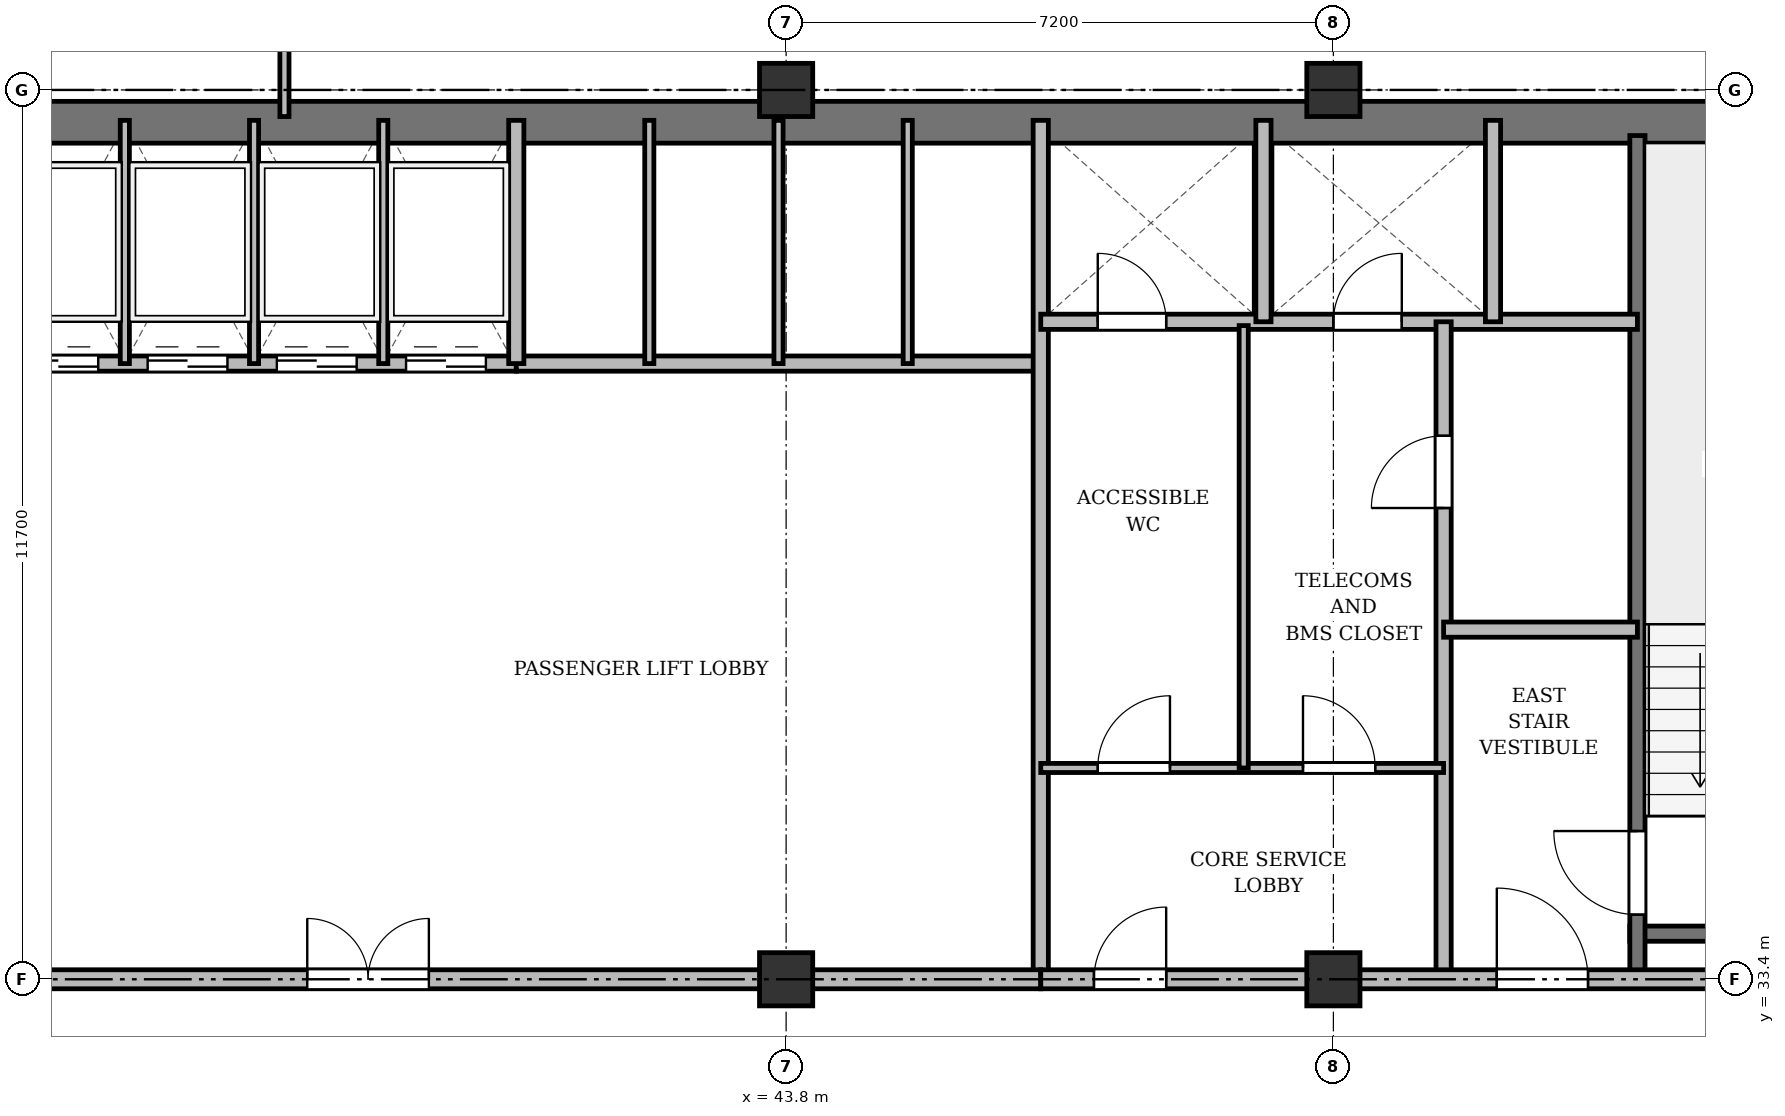
"""IFC4 building model, lengths in metres.
Left out: names, types, materials, properties, quantities, classifications, styles, units other than length and angle.
Written with IfcOpenShell. Run it as: python <this file> out.ifc"""

import sys

from ifc_helpers import new_model, si_unit, direction, frame, frame_2d, origin, origin_2d, place, context, subcontext, project, spatial, rectangle, extrude, source, transform, mapped, element, fill, save


model = new_model("IFC4")
c1 = context("Model", 3, precision=1e-05, world=origin(), true_north=direction((0.0, 1.0)))
c2 = subcontext(c1, "Body", "Model", "MODEL_VIEW")
j1 = project(units=[si_unit("LENGTHUNIT", "METRE"), si_unit("PLANEANGLEUNIT", "RADIAN")], contexts=[c1])
p1 = place(None, origin())
s1 = spatial("IfcSite", under=j1, at=p1, CompositionType="ELEMENT")
p2 = place(p1, origin())
s2 = spatial("IfcBuilding", under=s1, at=p2, CompositionType="ELEMENT")
p3 = place(p2, frame((0.0, 0.0, 204.9)))
s3 = spatial("IfcBuildingStorey", under=s2, at=p3, CompositionType="ELEMENT", Elevation=204.9)
m1 = source(origin(), c2, "Body", "SweptSolid", [
    extrude(rectangle(XDim=0.7, YDim=0.7, at=origin_2d()), origin(), (0.0, 0.0, 1.0), 3.6),
])
for number, where, z_axis, x_axis in (
    (1, (43.8, 33.4, 0.0), (0.0, 0.0, 1.0), (1.0, 0.0, 0.0)),
    (2, (43.8, 45.1, 0.0), (0.0, 0.0, 1.0), (1.0, 0.0, 0.0)),
    (3, (51.0, 33.4, 0.0), (0.0, 0.0, 1.0), (1.0, 0.0, 0.0)),
    (4, (51.0, 45.1, 0.0), (0.0, 0.0, 1.0), (1.0, 0.0, 0.0)),
):
    element("IfcColumn", number, at=place(p3, frame(where, z_axis=z_axis, x_axis=x_axis)), inside=s3, PredefinedType="COLUMN", context=c2, shape_type="MappedRepresentation", body=[
        mapped(m1, transform((0.0, 0.0, 0.0), x_axis=(1.0, 0.0, 0.0), y_axis=(0.0, 1.0, 0.0), z_axis=(0.0, 0.0, 1.0), scale=1.0)),
    ])
p4 = place(p3, frame((15.65, 44.675, 0.0), z_axis=(0.0, 0.0, 1.0), x_axis=(1.0, 0.0, 0.0)))
e5 = element("IfcWall", 5, at=p4, inside=s3, PredefinedType="SHEAR", context=c2, shape_type="SweptSolid", body=[
    extrude(rectangle(XDim=43.1, YDim=0.55, at=frame_2d((21.55, 0.0))), origin(), (0.0, 0.0, 1.0), 3.36),
])
p5 = place(p3, frame((54.9, 34.0, 0.0), z_axis=(0.0, 0.0, 1.0), x_axis=(1.0, 0.0, 0.0)))
e6 = element("IfcWall", 6, at=p5, inside=s3, PredefinedType="SHEAR", context=c2, shape_type="SweptSolid", body=[
    extrude(rectangle(XDim=3.4, YDim=0.2, at=frame_2d((1.7, 0.0))), origin(), (0.0, 0.0, 1.0), 3.36),
])
p6 = place(p3, frame((55.0, 33.4, 0.0), z_axis=(0.0, 0.0, 1.0), x_axis=(0.0, 1.0, 0.0)))
e7 = element("IfcWall", 7, at=p6, inside=s3, PredefinedType="SHEAR", context=c2, shape_type="SweptSolid", body=[
    extrude(rectangle(XDim=11.1, YDim=0.2, at=frame_2d((5.55, 0.0))), origin(), (0.0, 0.0, 1.0), 3.36),
])
p7 = place(p6, frame((0.85, 0.0, 0.0)))
e8 = element("IfcOpeningElement", 8, at=p7, cuts=e7, PredefinedType="OPENING", context=c2, shape_type="SweptSolid", body=[
    extrude(rectangle(XDim=1.1, YDim=2.15, at=frame_2d((0.55, 1.075))), frame((0.0, 0.11, 0.0), z_axis=(0.0, -1.0, 0.0), x_axis=(1.0, 0.0, 0.0)), (0.0, 0.0, 1.0), 0.22),
])
p8 = place(p3, frame((33.35, 41.5, 0.0), z_axis=(0.0, 0.0, 1.0), x_axis=(1.0, 0.0, 0.0)))
e9 = element("IfcWall", 9, at=p8, inside=s3, PredefinedType="SOLIDWALL", context=c2, shape_type="SweptSolid", body=[
    extrude(rectangle(XDim=6.9, YDim=0.2, at=frame_2d((3.45, 0.0))), origin(), (0.0, 0.0, 1.0), 3.36),
])
p9 = place(p8, frame((0.35, 0.0, 0.0)))
e10 = element("IfcOpeningElement", 10, at=p9, cuts=e9, PredefinedType="OPENING", context=c2, shape_type="SweptSolid", body=[
    extrude(rectangle(XDim=1.05, YDim=2.15, at=frame_2d((0.525, 1.075))), frame((0.0, 0.11, 0.0), z_axis=(0.0, -1.0, 0.0), x_axis=(1.0, 0.0, 0.0)), (0.0, 0.0, 1.0), 0.22),
])
p10 = place(p8, frame((2.05, 0.0, 0.0)))
e11 = element("IfcOpeningElement", 11, at=p10, cuts=e9, PredefinedType="OPENING", context=c2, shape_type="SweptSolid", body=[
    extrude(rectangle(XDim=1.05, YDim=2.15, at=frame_2d((0.525, 1.075))), frame((0.0, 0.11, 0.0), z_axis=(0.0, -1.0, 0.0), x_axis=(1.0, 0.0, 0.0)), (0.0, 0.0, 1.0), 0.22),
])
p11 = place(p8, frame((3.75, 0.0, 0.0)))
e12 = element("IfcOpeningElement", 12, at=p11, cuts=e9, PredefinedType="OPENING", context=c2, shape_type="SweptSolid", body=[
    extrude(rectangle(XDim=1.05, YDim=2.15, at=frame_2d((0.525, 1.075))), frame((0.0, 0.11, 0.0), z_axis=(0.0, -1.0, 0.0), x_axis=(1.0, 0.0, 0.0)), (0.0, 0.0, 1.0), 0.22),
])
p12 = place(p8, frame((5.45, 0.0, 0.0)))
e13 = element("IfcOpeningElement", 13, at=p12, cuts=e9, PredefinedType="OPENING", context=c2, shape_type="SweptSolid", body=[
    extrude(rectangle(XDim=1.05, YDim=2.15, at=frame_2d((0.525, 1.075))), frame((0.0, 0.11, 0.0), z_axis=(0.0, -1.0, 0.0), x_axis=(1.0, 0.0, 0.0)), (0.0, 0.0, 1.0), 0.22),
])
for number, where, z_axis, x_axis in (
    (14, (35.1, 41.5, 0.0), (0.0, 0.0, 1.0), (0.0, 1.0, 0.0)),
    (15, (36.8, 41.5, 0.0), (0.0, 0.0, 1.0), (0.0, 1.0, 0.0)),
    (16, (38.5, 41.5, 0.0), (0.0, 0.0, 1.0), (0.0, 1.0, 0.0)),
):
    element("IfcWall", number, at=place(p3, frame(where, z_axis=z_axis, x_axis=x_axis)), inside=s3, PredefinedType="PARTITIONING", context=c2, shape_type="SweptSolid", body=[
        extrude(rectangle(XDim=3.2, YDim=0.12, at=frame_2d((1.6, 0.0))), origin(), (0.0, 0.0, 1.0), 3.36),
    ])
p13 = place(p3, frame((40.25, 41.5, 0.0), z_axis=(0.0, 0.0, 1.0), x_axis=(1.0, 0.0, 0.0)))
e17 = element("IfcWall", 17, at=p13, inside=s3, PredefinedType="SOLIDWALL", context=c2, shape_type="SweptSolid", body=[
    extrude(rectangle(XDim=6.9, YDim=0.2, at=frame_2d((3.45, 0.0))), origin(), (0.0, 0.0, 1.0), 2.86),
])
p14 = place(p3, frame((40.25, 41.5, 0.0), z_axis=(0.0, 0.0, 1.0), x_axis=(0.0, 1.0, 0.0)))
e18 = element("IfcWall", 18, at=p14, inside=s3, PredefinedType="SOLIDWALL", context=c2, shape_type="SweptSolid", body=[
    extrude(rectangle(XDim=3.2, YDim=0.2, at=frame_2d((1.6, 0.0))), origin(), (0.0, 0.0, 1.0), 3.36),
])
p15 = place(p3, frame((42.0, 41.5, 0.0), z_axis=(0.0, 0.0, 1.0), x_axis=(0.0, 1.0, 0.0)))
e19 = element("IfcWall", 19, at=p15, inside=s3, PredefinedType="PARTITIONING", context=c2, shape_type="SweptSolid", body=[
    extrude(rectangle(XDim=3.2, YDim=0.12, at=frame_2d((1.6, 0.0))), origin(), (0.0, 0.0, 1.0), 3.36),
])
p16 = place(p3, frame((43.7, 41.5, 0.0), z_axis=(0.0, 0.0, 1.0), x_axis=(0.0, 1.0, 0.0)))
e20 = element("IfcWall", 20, at=p16, inside=s3, PredefinedType="PARTITIONING", context=c2, shape_type="SweptSolid", body=[
    extrude(rectangle(XDim=3.2, YDim=0.12, at=frame_2d((1.6, 0.0))), origin(), (0.0, 0.0, 1.0), 2.86),
])
p17 = place(p3, frame((45.4, 41.5, 0.0), z_axis=(0.0, 0.0, 1.0), x_axis=(0.0, 1.0, 0.0)))
e21 = element("IfcWall", 21, at=p17, inside=s3, PredefinedType="PARTITIONING", context=c2, shape_type="SweptSolid", body=[
    extrude(rectangle(XDim=3.2, YDim=0.12, at=frame_2d((1.6, 0.0))), origin(), (0.0, 0.0, 1.0), 3.36),
])
p18 = place(p3, frame((47.15, 33.4, 0.0), z_axis=(0.0, 0.0, 1.0), x_axis=(0.0, 1.0, 0.0)))
e22 = element("IfcWall", 22, at=p18, inside=s3, PredefinedType="SOLIDWALL", context=c2, shape_type="SweptSolid", body=[
    extrude(rectangle(XDim=11.3, YDim=0.2, at=frame_2d((5.65, 0.0))), origin(), (0.0, 0.0, 1.0), 2.91),
])
p19 = place(p3, frame((33.3, 33.4, 0.0), z_axis=(0.0, 0.0, 1.0), x_axis=(1.0, 0.0, 0.0)))
e23 = element("IfcWall", 23, at=p19, inside=s3, PredefinedType="PARTITIONING", context=c2, shape_type="SweptSolid", body=[
    extrude(rectangle(XDim=13.85, YDim=0.25, at=frame_2d((6.925, 0.0))), origin(), (0.0, 0.0, 1.0), 2.91),
])
p20 = place(p19, frame((4.2, 0.0, 0.0)))
e24 = element("IfcOpeningElement", 24, at=p20, cuts=e23, PredefinedType="OPENING", context=c2, shape_type="SweptSolid", body=[
    extrude(rectangle(XDim=1.6, YDim=2.2, at=frame_2d((0.8, 1.1))), frame((0.0, 0.135, 0.0), z_axis=(0.0, -1.0, 0.0), x_axis=(1.0, 0.0, 0.0)), (0.0, 0.0, 1.0), 0.27),
])
p21 = place(p3, frame((47.15, 42.05, 0.0), z_axis=(0.0, 0.0, 1.0), x_axis=(1.0, 0.0, 0.0)))
e25 = element("IfcWall", 25, at=p21, inside=s3, PredefinedType="SOLIDWALL", context=c2, shape_type="SweptSolid", body=[
    extrude(rectangle(XDim=7.85, YDim=0.2, at=frame_2d((3.925, 0.0))), origin(), (0.0, 0.0, 1.0), 2.86),
])
p22 = place(p21, frame((0.75, 0.0, 0.0)))
e26 = element("IfcOpeningElement", 26, at=p22, cuts=e25, PredefinedType="OPENING", context=c2, shape_type="SweptSolid", body=[
    extrude(rectangle(XDim=0.9, YDim=2.1, at=frame_2d((0.45, 1.05))), frame((0.0, 0.11, 0.0), z_axis=(0.0, -1.0, 0.0), x_axis=(1.0, 0.0, 0.0)), (0.0, 0.0, 1.0), 0.22),
])
p23 = place(p21, frame((3.85, 0.0, 0.0)))
e27 = element("IfcOpeningElement", 27, at=p23, cuts=e25, PredefinedType="OPENING", context=c2, shape_type="SweptSolid", body=[
    extrude(rectangle(XDim=0.9, YDim=2.1, at=frame_2d((0.45, 1.05))), frame((0.0, 0.11, 0.0), z_axis=(0.0, -1.0, 0.0), x_axis=(1.0, 0.0, 0.0)), (0.0, 0.0, 1.0), 0.22),
])
for number, where, z_axis, x_axis in (
    (28, (50.08, 42.05, 0.0), (0.0, 0.0, 1.0), (0.0, 1.0, 0.0)),
    (29, (53.1, 42.05, 0.0), (0.0, 0.0, 1.0), (0.0, 1.0, 0.0)),
):
    element("IfcWall", number, at=place(p3, frame(where, z_axis=z_axis, x_axis=x_axis)), inside=s3, PredefinedType="SOLIDWALL", context=c2, shape_type="SweptSolid", body=[
        extrude(rectangle(XDim=2.65, YDim=0.2, at=frame_2d((1.325, 0.0))), origin(), (0.0, 0.0, 1.0), 3.36),
    ])
p24 = place(p3, frame((52.45, 33.4, 0.0), z_axis=(0.0, 0.0, 1.0), x_axis=(0.0, 1.0, 0.0)))
e30 = element("IfcWall", 30, at=p24, inside=s3, PredefinedType="PARTITIONING", context=c2, shape_type="SweptSolid", body=[
    extrude(rectangle(XDim=8.65, YDim=0.2, at=frame_2d((4.325, 0.0))), origin(), (0.0, 0.0, 1.0), 2.91),
])
p25 = place(p24, frame((6.2, 0.0, 0.0)))
e31 = element("IfcOpeningElement", 31, at=p25, cuts=e30, PredefinedType="OPENING", context=c2, shape_type="SweptSolid", body=[
    extrude(rectangle(XDim=0.95, YDim=2.15, at=frame_2d((0.475, 1.075))), frame((0.0, 0.11, 0.0), z_axis=(0.0, -1.0, 0.0), x_axis=(1.0, 0.0, 0.0)), (0.0, 0.0, 1.0), 0.22),
])
p26 = place(p3, frame((52.45, 38.0, 0.0), z_axis=(0.0, 0.0, 1.0), x_axis=(1.0, 0.0, 0.0)))
e32 = element("IfcWall", 32, at=p26, inside=s3, PredefinedType="PARTITIONING", context=c2, shape_type="SweptSolid", body=[
    extrude(rectangle(XDim=2.55, YDim=0.2, at=frame_2d((1.275, 0.0))), origin(), (0.0, 0.0, 1.0), 3.36),
])
p27 = place(p3, frame((47.15, 36.18, 0.0), z_axis=(0.0, 0.0, 1.0), x_axis=(1.0, 0.0, 0.0)))
e33 = element("IfcWall", 33, at=p27, inside=s3, PredefinedType="PARTITIONING", context=c2, shape_type="SweptSolid", body=[
    extrude(rectangle(XDim=5.3, YDim=0.12, at=frame_2d((2.65, 0.0))), origin(), (0.0, 0.0, 1.0), 2.86),
])
p28 = place(p27, frame((0.75, 0.0, 0.0)))
e34 = element("IfcOpeningElement", 34, at=p28, cuts=e33, PredefinedType="OPENING", context=c2, shape_type="SweptSolid", body=[
    extrude(rectangle(XDim=0.95, YDim=2.15, at=frame_2d((0.475, 1.075))), frame((0.0, 0.07, 0.0), z_axis=(0.0, -1.0, 0.0), x_axis=(1.0, 0.0, 0.0)), (0.0, 0.0, 1.0), 0.14),
])
p29 = place(p27, frame((3.45, 0.0, 0.0)))
e35 = element("IfcOpeningElement", 35, at=p29, cuts=e33, PredefinedType="OPENING", context=c2, shape_type="SweptSolid", body=[
    extrude(rectangle(XDim=0.95, YDim=2.15, at=frame_2d((0.475, 1.075))), frame((0.0, 0.07, 0.0), z_axis=(0.0, -1.0, 0.0), x_axis=(1.0, 0.0, 0.0)), (0.0, 0.0, 1.0), 0.14),
])
p30 = place(p3, frame((49.82, 36.18, 0.0), z_axis=(0.0, 0.0, 1.0), x_axis=(0.0, 1.0, 0.0)))
e36 = element("IfcWall", 36, at=p30, inside=s3, PredefinedType="PARTITIONING", context=c2, shape_type="SweptSolid", body=[
    extrude(rectangle(XDim=5.82, YDim=0.12, at=frame_2d((2.91, 0.0))), origin(), (0.0, 0.0, 1.0), 3.36),
])
p31 = place(p3, frame((47.15, 33.4, 0.0), z_axis=(0.0, 0.0, 1.0), x_axis=(1.0, 0.0, 0.0)))
e37 = element("IfcWall", 37, at=p31, inside=s3, PredefinedType="PARTITIONING", context=c2, shape_type="SweptSolid", body=[
    extrude(rectangle(XDim=11.15, YDim=0.25, at=frame_2d((5.575, 0.0))), origin(), (0.0, 0.0, 1.0), 2.91),
])
p32 = place(p31, frame((0.7, 0.0, 0.0)))
e38 = element("IfcOpeningElement", 38, at=p32, cuts=e37, PredefinedType="OPENING", context=c2, shape_type="SweptSolid", body=[
    extrude(rectangle(XDim=0.95, YDim=2.15, at=frame_2d((0.475, 1.075))), frame((0.0, 0.135, 0.0), z_axis=(0.0, -1.0, 0.0), x_axis=(1.0, 0.0, 0.0)), (0.0, 0.0, 1.0), 0.27),
])
p33 = place(p31, frame((6.0, 0.0, 0.0)))
e39 = element("IfcOpeningElement", 39, at=p33, cuts=e37, PredefinedType="OPENING", context=c2, shape_type="SweptSolid", body=[
    extrude(rectangle(XDim=1.2, YDim=2.15, at=frame_2d((0.6, 1.075))), frame((0.0, 0.135, 0.0), z_axis=(0.0, -1.0, 0.0), x_axis=(1.0, 0.0, 0.0)), (0.0, 0.0, 1.0), 0.27),
])
p34 = place(p3, frame((37.2, 44.75, 0.0), z_axis=(0.0, 0.0, 1.0), x_axis=(0.0, 1.0, 0.0)))
e40 = element("IfcWall", 40, at=p34, inside=s3, PredefinedType="PARTITIONING", context=c2, shape_type="SweptSolid", body=[
    extrude(rectangle(XDim=3.61, YDim=0.12, at=frame_2d((1.805, 0.0))), origin(), (0.0, 0.0, 1.0), 2.91),
])
p35 = place(p34, frame((1.1, 0.0, 0.0)))
e41 = element("IfcOpeningElement", 41, at=p35, cuts=e40, PredefinedType="OPENING", context=c2, shape_type="SweptSolid", body=[
    extrude(rectangle(XDim=0.95, YDim=2.15, at=frame_2d((0.475, 1.075))), frame((0.0, 0.07, 0.0), z_axis=(0.0, -1.0, 0.0), x_axis=(1.0, 0.0, 0.0)), (0.0, 0.0, 1.0), 0.14),
])
m2 = source(origin(), c2, "Body", "SweptSolid", [
    extrude(rectangle(XDim=1.1, YDim=2.15, at=frame_2d((0.55, 1.075))), frame((0.0, 0.025, 0.0), z_axis=(0.0, -1.0, 0.0), x_axis=(1.0, 0.0, 0.0)), (0.0, 0.0, 1.0), 0.05),
])
p36 = place(p7, origin())
e42 = element("IfcDoor", 42, at=p36, inside=s3, OperationType="SINGLE_SWING_RIGHT", PredefinedType="DOOR", context=c2, shape_type="MappedRepresentation", body=[
    mapped(m2, transform((0.0, 0.0, 0.0), x_axis=(1.0, 0.0, 0.0), y_axis=(0.0, 1.0, 0.0), z_axis=(0.0, 0.0, 1.0), scale=1.0)),
])
fill(e8, e42)
m3 = source(origin(), c2, "Body", "SweptSolid", [
    extrude(rectangle(XDim=1.05, YDim=2.15, at=frame_2d((0.525, 1.075))), frame((0.0, 0.025, 0.0), z_axis=(0.0, -1.0, 0.0), x_axis=(1.0, 0.0, 0.0)), (0.0, 0.0, 1.0), 0.05),
])
p37 = place(p9, origin())
e43 = element("IfcDoor", 43, at=p37, inside=s3, OperationType="DOUBLE_DOOR_SLIDING", PredefinedType="DOOR", context=c2, shape_type="MappedRepresentation", body=[
    mapped(m3, transform((0.0, 0.0, 0.0), x_axis=(1.0, 0.0, 0.0), y_axis=(0.0, 1.0, 0.0), z_axis=(0.0, 0.0, 1.0), scale=1.0)),
])
fill(e10, e43)
p38 = place(p10, origin())
e44 = element("IfcDoor", 44, at=p38, inside=s3, OperationType="DOUBLE_DOOR_SLIDING", PredefinedType="DOOR", context=c2, shape_type="MappedRepresentation", body=[
    mapped(m3, transform((0.0, 0.0, 0.0), x_axis=(1.0, 0.0, 0.0), y_axis=(0.0, 1.0, 0.0), z_axis=(0.0, 0.0, 1.0), scale=1.0)),
])
fill(e11, e44)
p39 = place(p11, origin())
e45 = element("IfcDoor", 45, at=p39, inside=s3, OperationType="DOUBLE_DOOR_SLIDING", PredefinedType="DOOR", context=c2, shape_type="MappedRepresentation", body=[
    mapped(m3, transform((0.0, 0.0, 0.0), x_axis=(1.0, 0.0, 0.0), y_axis=(0.0, 1.0, 0.0), z_axis=(0.0, 0.0, 1.0), scale=1.0)),
])
fill(e12, e45)
p40 = place(p12, origin())
e46 = element("IfcDoor", 46, at=p40, inside=s3, OperationType="DOUBLE_DOOR_SLIDING", PredefinedType="DOOR", context=c2, shape_type="MappedRepresentation", body=[
    mapped(m3, transform((0.0, 0.0, 0.0), x_axis=(1.0, 0.0, 0.0), y_axis=(0.0, 1.0, 0.0), z_axis=(0.0, 0.0, 1.0), scale=1.0)),
])
fill(e13, e46)
m4 = source(origin(), c2, "Body", "SweptSolid", [
    extrude(rectangle(XDim=1.6, YDim=2.2, at=frame_2d((0.8, 1.1))), frame((0.0, 0.025, 0.0), z_axis=(0.0, -1.0, 0.0), x_axis=(1.0, 0.0, 0.0)), (0.0, 0.0, 1.0), 0.05),
])
p41 = place(p20, origin())
e47 = element("IfcDoor", 47, at=p41, inside=s3, OperationType="DOUBLE_DOOR_SINGLE_SWING", PredefinedType="DOOR", context=c2, shape_type="MappedRepresentation", body=[
    mapped(m4, transform((0.0, 0.0, 0.0), x_axis=(1.0, 0.0, 0.0), y_axis=(0.0, 1.0, 0.0), z_axis=(0.0, 0.0, 1.0), scale=1.0)),
])
fill(e24, e47)
m5 = source(origin(), c2, "Body", "SweptSolid", [
    extrude(rectangle(XDim=0.9, YDim=2.1, at=frame_2d((0.45, 1.05))), frame((0.0, 0.025, 0.0), z_axis=(0.0, -1.0, 0.0), x_axis=(1.0, 0.0, 0.0)), (0.0, 0.0, 1.0), 0.05),
])
p42 = place(p22, origin())
e48 = element("IfcDoor", 48, at=p42, inside=s3, OperationType="SINGLE_SWING_LEFT", PredefinedType="DOOR", context=c2, shape_type="MappedRepresentation", body=[
    mapped(m5, transform((0.0, 0.0, 0.0), x_axis=(1.0, 0.0, 0.0), y_axis=(0.0, 1.0, 0.0), z_axis=(0.0, 0.0, 1.0), scale=1.0)),
])
fill(e26, e48)
p43 = place(p23, origin())
e49 = element("IfcDoor", 49, at=p43, inside=s3, OperationType="SINGLE_SWING_RIGHT", PredefinedType="DOOR", context=c2, shape_type="MappedRepresentation", body=[
    mapped(m5, transform((0.0, 0.0, 0.0), x_axis=(1.0, 0.0, 0.0), y_axis=(0.0, 1.0, 0.0), z_axis=(0.0, 0.0, 1.0), scale=1.0)),
])
fill(e27, e49)
m6 = source(origin(), c2, "Body", "SweptSolid", [
    extrude(rectangle(XDim=0.95, YDim=2.15, at=frame_2d((0.475, 1.075))), frame((0.0, 0.025, 0.0), z_axis=(0.0, -1.0, 0.0), x_axis=(1.0, 0.0, 0.0)), (0.0, 0.0, 1.0), 0.05),
])
p44 = place(p25, origin())
e50 = element("IfcDoor", 50, at=p44, inside=s3, OperationType="SINGLE_SWING_LEFT", PredefinedType="DOOR", context=c2, shape_type="MappedRepresentation", body=[
    mapped(m6, transform((0.0, 0.0, 0.0), x_axis=(1.0, 0.0, 0.0), y_axis=(0.0, 1.0, 0.0), z_axis=(0.0, 0.0, 1.0), scale=1.0)),
])
fill(e31, e50)
p45 = place(p28, origin())
e51 = element("IfcDoor", 51, at=p45, inside=s3, OperationType="SINGLE_SWING_RIGHT", PredefinedType="DOOR", context=c2, shape_type="MappedRepresentation", body=[
    mapped(m6, transform((0.0, 0.0, 0.0), x_axis=(1.0, 0.0, 0.0), y_axis=(0.0, 1.0, 0.0), z_axis=(0.0, 0.0, 1.0), scale=1.0)),
])
fill(e34, e51)
p46 = place(p29, origin())
e52 = element("IfcDoor", 52, at=p46, inside=s3, OperationType="SINGLE_SWING_LEFT", PredefinedType="DOOR", context=c2, shape_type="MappedRepresentation", body=[
    mapped(m6, transform((0.0, 0.0, 0.0), x_axis=(1.0, 0.0, 0.0), y_axis=(0.0, 1.0, 0.0), z_axis=(0.0, 0.0, 1.0), scale=1.0)),
])
fill(e35, e52)
p47 = place(p32, origin())
e53 = element("IfcDoor", 53, at=p47, inside=s3, OperationType="SINGLE_SWING_RIGHT", PredefinedType="DOOR", context=c2, shape_type="MappedRepresentation", body=[
    mapped(m6, transform((0.0, 0.0, 0.0), x_axis=(1.0, 0.0, 0.0), y_axis=(0.0, 1.0, 0.0), z_axis=(0.0, 0.0, 1.0), scale=1.0)),
])
fill(e38, e53)
m7 = source(origin(), c2, "Body", "SweptSolid", [
    extrude(rectangle(XDim=1.2, YDim=2.15, at=frame_2d((0.6, 1.075))), frame((0.0, 0.025, 0.0), z_axis=(0.0, -1.0, 0.0), x_axis=(1.0, 0.0, 0.0)), (0.0, 0.0, 1.0), 0.05),
])
p48 = place(p33, origin())
e54 = element("IfcDoor", 54, at=p48, inside=s3, OperationType="SINGLE_SWING_LEFT", PredefinedType="DOOR", context=c2, shape_type="MappedRepresentation", body=[
    mapped(m7, transform((0.0, 0.0, 0.0), x_axis=(1.0, 0.0, 0.0), y_axis=(0.0, 1.0, 0.0), z_axis=(0.0, 0.0, 1.0), scale=1.0)),
])
fill(e39, e54)
save(model, sys.argv[1])
